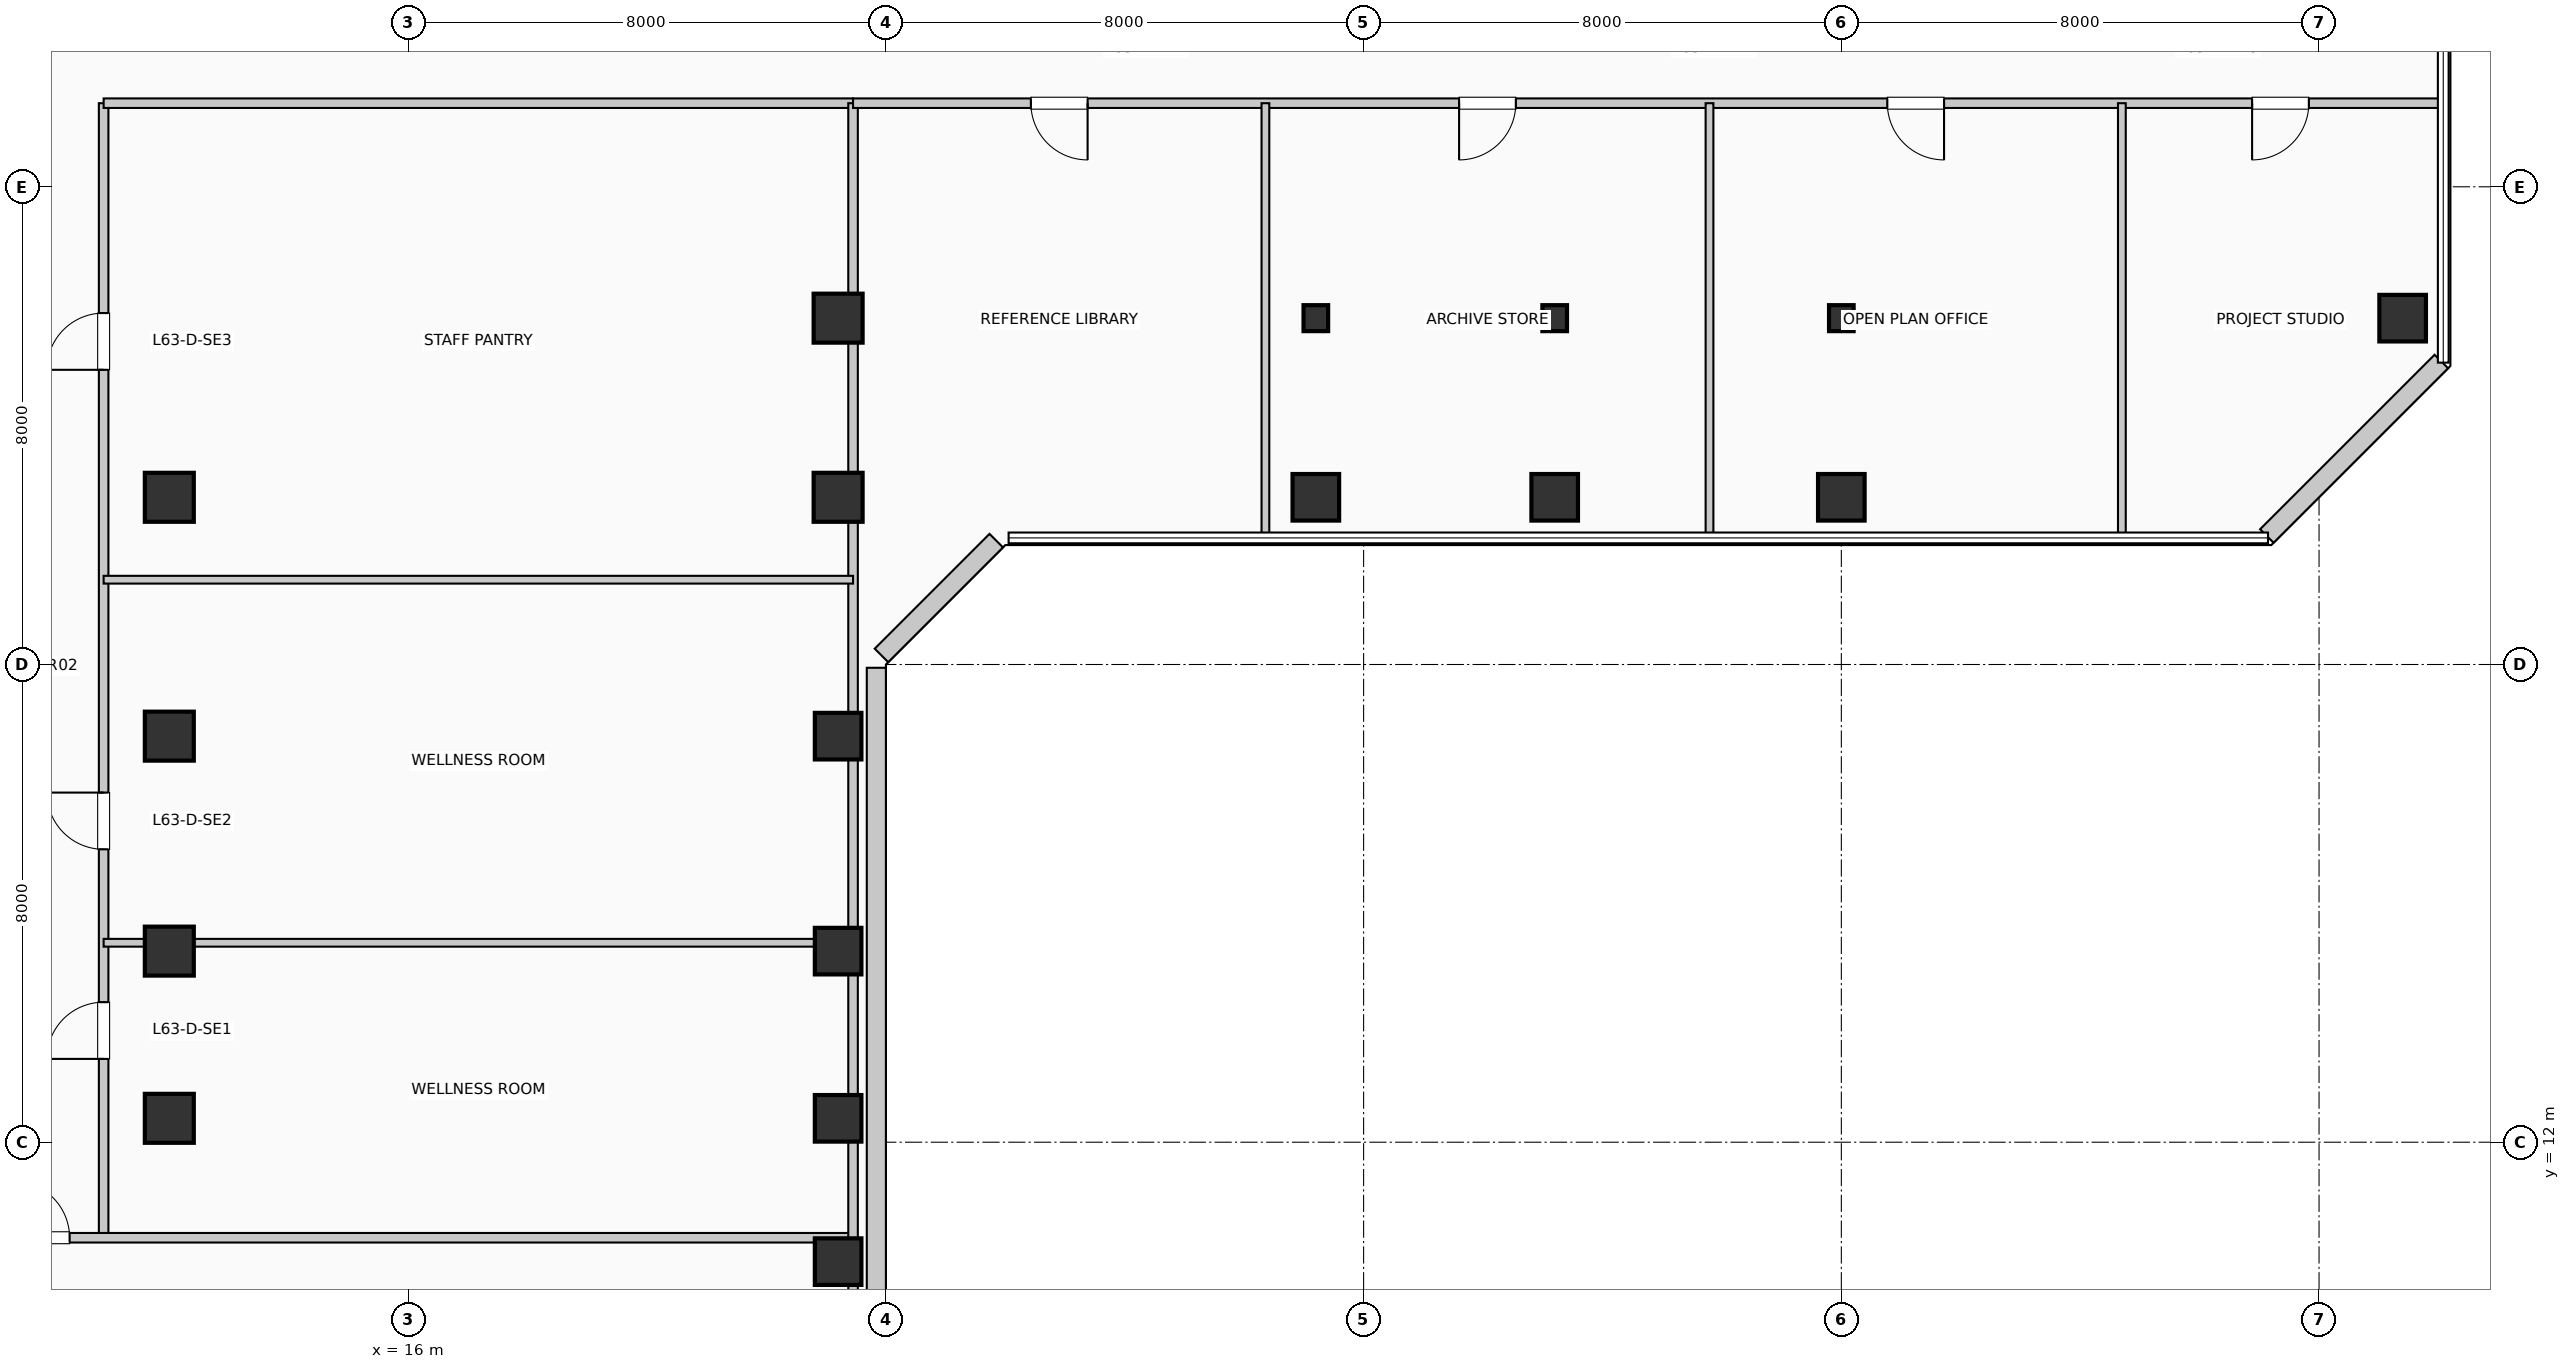
"""IFC4 building model, lengths in metres.
Left out: names, types, materials, properties, quantities, classifications, styles, units other than length and angle.
Written with IfcOpenShell. Run it as: python <this file> out.ifc"""

import sys

from ifc_helpers import new_model, si_unit, direction, frame, frame_2d, origin, origin_2d, place, context, subcontext, project, spatial, rectangle, i_section, extrude, element, fill, save


model = new_model("IFC4")
c1 = context("Model", 3, precision=1e-05, world=origin(), true_north=direction((0.0, 1.0)))
c2 = subcontext(c1, "Body", "Model", "MODEL_VIEW")
j1 = project(units=[si_unit("LENGTHUNIT", "METRE"), si_unit("PLANEANGLEUNIT", "RADIAN")], contexts=[c1])
p1 = place(None, origin())
s1 = spatial("IfcSite", under=j1, at=p1, CompositionType="ELEMENT")
p2 = place(p1, origin())
s2 = spatial("IfcBuilding", under=s1, at=p2, CompositionType="ELEMENT")
p3 = place(p2, frame((0.0, 0.0, 260.37)))
s3 = spatial("IfcBuildingStorey", under=s2, at=p3, CompositionType="ELEMENT", Elevation=260.37)
for number, where, z_axis, x_axis in (
    (1, (12.0, 12.4, 0.0), (0.0, 0.0, 1.0), (1.0, 0.0, 0.0)),
    (2, (12.0, 15.2, 0.0), (0.0, 0.0, 1.0), (1.0, 0.0, 0.0)),
    (3, (12.0, 18.8, 0.0), (0.0, 0.0, 1.0), (1.0, 0.0, 0.0)),
    (4, (12.0, 22.8, 0.0), (0.0, 0.0, 1.0), (1.0, 0.0, 0.0)),
):
    element("IfcColumn", number, at=place(p3, frame(where, z_axis=z_axis, x_axis=x_axis)), inside=s3, PredefinedType="COLUMN", context=c2, shape_type="SweptSolid", body=[
        extrude(rectangle(XDim=0.82, YDim=0.82, at=origin_2d()), origin(), (0.0, 0.0, 1.0), 3.96),
    ])
for number, where, z_axis, x_axis in (
    (5, (23.2, 10.0, 0.0), (0.0, 0.0, 1.0), (1.0, 0.0, 0.0)),
    (6, (23.2, 12.4, 0.0), (0.0, 0.0, 1.0), (1.0, 0.0, 0.0)),
    (7, (23.2, 15.2, 0.0), (0.0, 0.0, 1.0), (1.0, 0.0, 0.0)),
    (8, (23.2, 18.8, 0.0), (0.0, 0.0, 1.0), (1.0, 0.0, 0.0)),
):
    element("IfcColumn", number, at=place(p3, frame(where, z_axis=z_axis, x_axis=x_axis)), inside=s3, PredefinedType="COLUMN", context=c2, shape_type="SweptSolid", body=[
        extrude(rectangle(XDim=0.78, YDim=0.78, at=origin_2d()), origin(), (0.0, 0.0, 1.0), 3.96),
    ])
for number, where, z_axis, x_axis in (
    (9, (23.2, 22.8, 0.0), (0.0, 0.0, 1.0), (1.0, 0.0, 0.0)),
    (10, (23.2, 25.8, 0.0), (0.0, 0.0, 1.0), (1.0, 0.0, 0.0)),
):
    element("IfcColumn", number, at=place(p3, frame(where, z_axis=z_axis, x_axis=x_axis)), inside=s3, PredefinedType="COLUMN", context=c2, shape_type="SweptSolid", body=[
        extrude(rectangle(XDim=0.82, YDim=0.82, at=origin_2d()), origin(), (0.0, 0.0, 1.0), 3.96),
    ])
p4 = place(p3, frame((31.2, 22.8, 0.0), z_axis=(0.0, 0.0, 1.0), x_axis=(1.0, 0.0, 0.0)))
e11 = element("IfcColumn", 11, at=p4, inside=s3, PredefinedType="COLUMN", context=c2, shape_type="SweptSolid", body=[
    extrude(rectangle(XDim=0.78, YDim=0.78, at=origin_2d()), origin(), (0.0, 0.0, 1.0), 3.96),
])
p5 = place(p3, frame((31.2, 25.8, 0.0), z_axis=(0.0, 0.0, 1.0), x_axis=(1.0, 0.0, 0.0)))
e12 = element("IfcColumn", 12, at=p5, inside=s3, PredefinedType="COLUMN", context=c2, shape_type="SweptSolid", body=[
    extrude(i_section(OverallWidth=0.412, OverallDepth=0.435, WebThickness=0.027, FlangeThickness=0.043, at=origin_2d()), origin(), (0.0, 0.0, 1.0), 3.96),
])
p6 = place(p3, frame((35.2, 22.8, 0.0), z_axis=(0.0, 0.0, 1.0), x_axis=(1.0, 0.0, 0.0)))
e13 = element("IfcColumn", 13, at=p6, inside=s3, PredefinedType="COLUMN", context=c2, shape_type="SweptSolid", body=[
    extrude(rectangle(XDim=0.78, YDim=0.78, at=origin_2d()), origin(), (0.0, 0.0, 1.0), 3.96),
])
p7 = place(p3, frame((35.2, 25.8, 0.0), z_axis=(0.0, 0.0, 1.0), x_axis=(1.0, 0.0, 0.0)))
e14 = element("IfcColumn", 14, at=p7, inside=s3, PredefinedType="COLUMN", context=c2, shape_type="SweptSolid", body=[
    extrude(i_section(OverallWidth=0.412, OverallDepth=0.435, WebThickness=0.027, FlangeThickness=0.043, at=origin_2d()), origin(), (0.0, 0.0, 1.0), 3.96),
])
p8 = place(p3, frame((40.0, 22.8, 0.0), z_axis=(0.0, 0.0, 1.0), x_axis=(1.0, 0.0, 0.0)))
e15 = element("IfcColumn", 15, at=p8, inside=s3, PredefinedType="COLUMN", context=c2, shape_type="SweptSolid", body=[
    extrude(rectangle(XDim=0.78, YDim=0.78, at=origin_2d()), origin(), (0.0, 0.0, 1.0), 3.96),
])
p9 = place(p3, frame((40.0, 25.8, 0.0), z_axis=(0.0, 0.0, 1.0), x_axis=(1.0, 0.0, 0.0)))
e16 = element("IfcColumn", 16, at=p9, inside=s3, PredefinedType="COLUMN", context=c2, shape_type="SweptSolid", body=[
    extrude(i_section(OverallWidth=0.412, OverallDepth=0.435, WebThickness=0.027, FlangeThickness=0.043, at=origin_2d()), origin(), (0.0, 0.0, 1.0), 3.96),
])
p10 = place(p3, frame((49.4, 25.8, 0.0), z_axis=(0.0, 0.0, 1.0), x_axis=(1.0, 0.0, 0.0)))
e17 = element("IfcColumn", 17, at=p10, inside=s3, PredefinedType="COLUMN", context=c2, shape_type="SweptSolid", body=[
    extrude(rectangle(XDim=0.78, YDim=0.78, at=origin_2d()), origin(), (0.0, 0.0, 1.0), 3.96),
])
p11 = place(p3, frame((23.84, 8.855, 0.0), z_axis=(0.0, 0.0, 1.0), x_axis=(0.0, 1.0, 0.0)))
e18 = element("IfcWall", 18, at=p11, inside=s3, PredefinedType="SOLIDWALL", context=c2, shape_type="SweptSolid", body=[
    extrude(rectangle(XDim=11.09, YDim=0.32, at=frame_2d((5.545, 0.0))), origin(), (0.0, 0.0, 1.0), 3.71),
])
p12 = place(p3, frame((23.926, 20.152, 0.0), z_axis=(0.0, 0.0, 1.0), x_axis=(0.707106781187, 0.707106781187, 0.0)))
e19 = element("IfcWall", 19, at=p12, inside=s3, PredefinedType="SOLIDWALL", context=c2, shape_type="SweptSolid", body=[
    extrude(rectangle(XDim=2.718, YDim=0.32, at=frame_2d((1.359, 0.0))), origin(), (0.0, 0.0, 1.0), 3.71),
])
p13 = place(p3, frame((47.126, 22.152, 0.0), z_axis=(0.0, 0.0, 1.0), x_axis=(0.707136318428, 0.707077242712, 0.0)))
e20 = element("IfcWall", 20, at=p13, inside=s3, PredefinedType="SOLIDWALL", context=c2, shape_type="SweptSolid", body=[
    extrude(rectangle(XDim=4.133, YDim=0.32, at=frame_2d((2.066, 0.0))), origin(), (0.0, 0.0, 1.0), 3.71),
])
p14 = place(p3, frame((10.9, 10.4, 0.0), z_axis=(0.0, 0.0, 1.0), x_axis=(0.0, 1.0, 0.0)))
e21 = element("IfcWall", 21, at=p14, inside=s3, PredefinedType="PARTITIONING", context=c2, shape_type="SweptSolid", body=[
    extrude(rectangle(XDim=19.0, YDim=0.16, at=frame_2d((9.5, 0.0))), origin(), (0.0, 0.0, 1.0), 3.71),
])
p15 = place(p14, frame((2.995, 0.0, 0.0)))
e22 = element("IfcOpeningElement", 22, at=p15, cuts=e21, PredefinedType="OPENING", context=c2, shape_type="SweptSolid", body=[
    extrude(rectangle(XDim=0.95, YDim=2.15, at=frame_2d((0.475, 1.075))), frame((0.0, 0.09, 0.0), z_axis=(0.0, -1.0, 0.0), x_axis=(1.0, 0.0, 0.0)), (0.0, 0.0, 1.0), 0.18),
])
p16 = place(p14, frame((6.505, 0.0, 0.0)))
e23 = element("IfcOpeningElement", 23, at=p16, cuts=e21, PredefinedType="OPENING", context=c2, shape_type="SweptSolid", body=[
    extrude(rectangle(XDim=0.95, YDim=2.15, at=frame_2d((0.475, 1.075))), frame((0.0, 0.09, 0.0), z_axis=(0.0, -1.0, 0.0), x_axis=(1.0, 0.0, 0.0)), (0.0, 0.0, 1.0), 0.18),
])
p17 = place(p14, frame((14.535, 0.0, 0.0)))
e24 = element("IfcOpeningElement", 24, at=p17, cuts=e21, PredefinedType="OPENING", context=c2, shape_type="SweptSolid", body=[
    extrude(rectangle(XDim=0.95, YDim=2.15, at=frame_2d((0.475, 1.075))), frame((0.0, 0.09, 0.0), z_axis=(0.0, -1.0, 0.0), x_axis=(1.0, 0.0, 0.0)), (0.0, 0.0, 1.0), 0.18),
])
p18 = place(p3, frame((0.19, 10.4, 0.0), z_axis=(0.0, 0.0, 1.0), x_axis=(1.0, 0.0, 0.0)))
e25 = element("IfcWall", 25, at=p18, inside=s3, PredefinedType="PARTITIONING", context=c2, shape_type="SweptSolid", body=[
    extrude(rectangle(XDim=23.26, YDim=0.16, at=frame_2d((11.63, 0.0))), origin(), (0.0, 0.0, 1.0), 3.095),
])
p19 = place(p18, frame((9.19, 0.0, 0.0)))
e26 = element("IfcOpeningElement", 26, at=p19, cuts=e25, PredefinedType="OPENING", context=c2, shape_type="SweptSolid", body=[
    extrude(rectangle(XDim=0.95, YDim=2.15, at=frame_2d((0.475, 1.075))), frame((0.0, 0.09, 0.0), z_axis=(0.0, -1.0, 0.0), x_axis=(1.0, 0.0, 0.0)), (0.0, 0.0, 1.0), 0.18),
])
p20 = place(p3, frame((10.9, 29.4, 0.0), z_axis=(0.0, 0.0, 1.0), x_axis=(1.0, 0.0, 0.0)))
e27 = element("IfcWall", 27, at=p20, inside=s3, PredefinedType="PARTITIONING", context=c2, shape_type="SweptSolid", body=[
    extrude(rectangle(XDim=12.55, YDim=0.16, at=frame_2d((6.275, 0.0))), origin(), (0.0, 0.0, 1.0), 3.365),
])
p21 = place(p3, frame((23.45, 5.99, 0.0), z_axis=(0.0, 0.0, 1.0), x_axis=(0.0, 1.0, 0.0)))
e28 = element("IfcWall", 28, at=p21, inside=s3, PredefinedType="PARTITIONING", context=c2, shape_type="SweptSolid", body=[
    extrude(rectangle(XDim=23.41, YDim=0.16, at=frame_2d((11.705, 0.0))), origin(), (0.0, 0.0, 1.0), 3.095),
])
p22 = place(p3, frame((10.9, 15.34, 0.0), z_axis=(0.0, 0.0, 1.0), x_axis=(1.0, 0.0, 0.0)))
e29 = element("IfcWall", 29, at=p22, inside=s3, PredefinedType="PARTITIONING", context=c2, shape_type="SweptSolid", body=[
    extrude(rectangle(XDim=12.55, YDim=0.13, at=frame_2d((6.275, 0.0))), origin(), (0.0, 0.0, 1.0), 3.095),
])
p23 = place(p3, frame((10.9, 21.42, 0.0), z_axis=(0.0, 0.0, 1.0), x_axis=(1.0, 0.0, 0.0)))
e30 = element("IfcWall", 30, at=p23, inside=s3, PredefinedType="PARTITIONING", context=c2, shape_type="SweptSolid", body=[
    extrude(rectangle(XDim=12.55, YDim=0.13, at=frame_2d((6.275, 0.0))), origin(), (0.0, 0.0, 1.0), 3.71),
])
p24 = place(p3, frame((23.45, 29.4, 0.0), z_axis=(0.0, 0.0, 1.0), x_axis=(1.0, 0.0, 0.0)))
e31 = element("IfcWall", 31, at=p24, inside=s3, PredefinedType="PARTITIONING", context=c2, shape_type="SweptSolid", body=[
    extrude(rectangle(XDim=26.56, YDim=0.16, at=frame_2d((13.28, 0.0))), origin(), (0.0, 0.0, 1.0), 3.365),
])
p25 = place(p24, frame((3.928, 0.0, 0.0), z_axis=(0.0, 0.0, 1.0), x_axis=(-1.0, 0.0, 0.0)))
e32 = element("IfcOpeningElement", 32, at=p25, cuts=e31, PredefinedType="OPENING", context=c2, shape_type="SweptSolid", body=[
    extrude(rectangle(XDim=0.95, YDim=2.15, at=frame_2d((0.475, 1.075))), frame((0.0, 0.09, 0.0), z_axis=(0.0, -1.0, 0.0), x_axis=(1.0, 0.0, 0.0)), (0.0, 0.0, 1.0), 0.18),
])
p26 = place(p24, frame((11.099, 0.0, 0.0), z_axis=(0.0, 0.0, 1.0), x_axis=(-1.0, 0.0, 0.0)))
e33 = element("IfcOpeningElement", 33, at=p26, cuts=e31, PredefinedType="OPENING", context=c2, shape_type="SweptSolid", body=[
    extrude(rectangle(XDim=0.95, YDim=2.15, at=frame_2d((0.475, 1.075))), frame((0.0, 0.09, 0.0), z_axis=(0.0, -1.0, 0.0), x_axis=(1.0, 0.0, 0.0)), (0.0, 0.0, 1.0), 0.18),
])
p27 = place(p24, frame((18.27, 0.0, 0.0), z_axis=(0.0, 0.0, 1.0), x_axis=(-1.0, 0.0, 0.0)))
e34 = element("IfcOpeningElement", 34, at=p27, cuts=e31, PredefinedType="OPENING", context=c2, shape_type="SweptSolid", body=[
    extrude(rectangle(XDim=0.95, YDim=2.15, at=frame_2d((0.475, 1.075))), frame((0.0, 0.09, 0.0), z_axis=(0.0, -1.0, 0.0), x_axis=(1.0, 0.0, 0.0)), (0.0, 0.0, 1.0), 0.18),
])
p28 = place(p24, frame((24.379, 0.0, 0.0), z_axis=(0.0, 0.0, 1.0), x_axis=(-1.0, 0.0, 0.0)))
e35 = element("IfcOpeningElement", 35, at=p28, cuts=e31, PredefinedType="OPENING", context=c2, shape_type="SweptSolid", body=[
    extrude(rectangle(XDim=0.95, YDim=2.15, at=frame_2d((0.475, 1.075))), frame((0.0, 0.09, 0.0), z_axis=(0.0, -1.0, 0.0), x_axis=(1.0, 0.0, 0.0)), (0.0, 0.0, 1.0), 0.18),
])
for number, where, z_axis, x_axis in (
    (36, (30.356, 22.19, 0.0), (0.0, 0.0, 1.0), (0.0, 1.0, 0.0)),
    (37, (37.792, 22.19, 0.0), (0.0, 0.0, 1.0), (0.0, 1.0, 0.0)),
    (38, (44.698, 22.19, 0.0), (0.0, 0.0, 1.0), (0.0, 1.0, 0.0)),
):
    element("IfcWall", number, at=place(p3, frame(where, z_axis=z_axis, x_axis=x_axis)), inside=s3, PredefinedType="PARTITIONING", context=c2, shape_type="SweptSolid", body=[
        extrude(rectangle(XDim=7.21, YDim=0.13, at=frame_2d((3.605, 0.0))), origin(), (0.0, 0.0, 1.0), 3.71),
    ])
p29 = place(p19, origin())
e39 = element("IfcDoor", 39, at=p29, inside=s3, OperationType="SINGLE_SWING_LEFT", PredefinedType="DOOR", context=c2, shape_type="SweptSolid", body=[
    extrude(rectangle(XDim=0.95, YDim=2.15, at=frame_2d((0.475, 1.075))), frame((0.0, 0.025, 0.0), z_axis=(0.0, -1.0, 0.0), x_axis=(1.0, 0.0, 0.0)), (0.0, 0.0, 1.0), 0.05),
])
fill(e26, e39)
p30 = place(p15, origin())
e40 = element("IfcDoor", 40, at=p30, inside=s3, OperationType="SINGLE_SWING_LEFT", PredefinedType="DOOR", context=c2, shape_type="SweptSolid", body=[
    extrude(rectangle(XDim=0.95, YDim=2.15, at=frame_2d((0.475, 1.075))), frame((0.0, 0.025, 0.0), z_axis=(0.0, -1.0, 0.0), x_axis=(1.0, 0.0, 0.0)), (0.0, 0.0, 1.0), 0.05),
])
fill(e22, e40)
p31 = place(p16, origin())
e41 = element("IfcDoor", 41, at=p31, inside=s3, OperationType="SINGLE_SWING_RIGHT", PredefinedType="DOOR", context=c2, shape_type="SweptSolid", body=[
    extrude(rectangle(XDim=0.95, YDim=2.15, at=frame_2d((0.475, 1.075))), frame((0.0, 0.025, 0.0), z_axis=(0.0, -1.0, 0.0), x_axis=(1.0, 0.0, 0.0)), (0.0, 0.0, 1.0), 0.05),
])
fill(e23, e41)
p32 = place(p17, origin())
e42 = element("IfcDoor", 42, at=p32, inside=s3, OperationType="SINGLE_SWING_LEFT", PredefinedType="DOOR", context=c2, shape_type="SweptSolid", body=[
    extrude(rectangle(XDim=0.95, YDim=2.15, at=frame_2d((0.475, 1.075))), frame((0.0, 0.025, 0.0), z_axis=(0.0, -1.0, 0.0), x_axis=(1.0, 0.0, 0.0)), (0.0, 0.0, 1.0), 0.05),
])
fill(e24, e42)
p33 = place(p25, origin())
e43 = element("IfcDoor", 43, at=p33, inside=s3, OperationType="SINGLE_SWING_RIGHT", PredefinedType="DOOR", context=c2, shape_type="SweptSolid", body=[
    extrude(rectangle(XDim=0.95, YDim=2.15, at=frame_2d((0.475, 1.075))), frame((0.0, 0.025, 0.0), z_axis=(0.0, -1.0, 0.0), x_axis=(1.0, 0.0, 0.0)), (0.0, 0.0, 1.0), 0.05),
])
fill(e32, e43)
p34 = place(p26, origin())
e44 = element("IfcDoor", 44, at=p34, inside=s3, OperationType="SINGLE_SWING_LEFT", PredefinedType="DOOR", context=c2, shape_type="SweptSolid", body=[
    extrude(rectangle(XDim=0.95, YDim=2.15, at=frame_2d((0.475, 1.075))), frame((0.0, 0.025, 0.0), z_axis=(0.0, -1.0, 0.0), x_axis=(1.0, 0.0, 0.0)), (0.0, 0.0, 1.0), 0.05),
])
fill(e33, e44)
p35 = place(p27, origin())
e45 = element("IfcDoor", 45, at=p35, inside=s3, OperationType="SINGLE_SWING_RIGHT", PredefinedType="DOOR", context=c2, shape_type="SweptSolid", body=[
    extrude(rectangle(XDim=0.95, YDim=2.15, at=frame_2d((0.475, 1.075))), frame((0.0, 0.025, 0.0), z_axis=(0.0, -1.0, 0.0), x_axis=(1.0, 0.0, 0.0)), (0.0, 0.0, 1.0), 0.05),
])
fill(e34, e45)
p36 = place(p28, origin())
e46 = element("IfcDoor", 46, at=p36, inside=s3, OperationType="SINGLE_SWING_LEFT", PredefinedType="DOOR", context=c2, shape_type="SweptSolid", body=[
    extrude(rectangle(XDim=0.95, YDim=2.15, at=frame_2d((0.475, 1.075))), frame((0.0, 0.025, 0.0), z_axis=(0.0, -1.0, 0.0), x_axis=(1.0, 0.0, 0.0)), (0.0, 0.0, 1.0), 0.05),
])
fill(e35, e46)
save(model, sys.argv[1])
